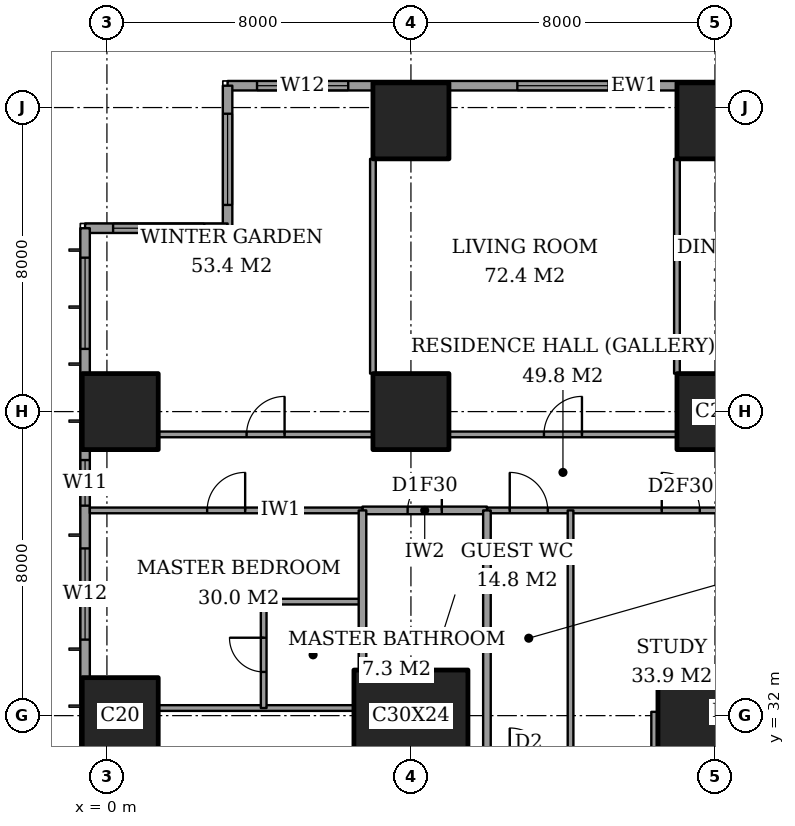
"""IFC4 building model, lengths in metres.
Left out: names, types, materials, properties, quantities, classifications, styles, units other than length and angle.
Written with IfcOpenShell. Run it as: python <this file> out.ifc"""

import sys

from ifc_helpers import new_model, si_unit, direction, frame, frame_2d, origin, origin_2d, place, context, subcontext, project, spatial, rectangle, extrude, element, fill, save


model = new_model("IFC4")
c1 = context("Model", 3, precision=1e-05, world=origin(), true_north=direction((0.0, 1.0)))
c2 = subcontext(c1, "Body", "Model", "MODEL_VIEW")
j1 = project(units=[si_unit("LENGTHUNIT", "METRE"), si_unit("PLANEANGLEUNIT", "RADIAN")], contexts=[c1])
p1 = place(None, origin())
s1 = spatial("IfcSite", under=j1, at=p1, CompositionType="ELEMENT")
p2 = place(p1, origin())
s2 = spatial("IfcBuilding", under=s1, at=p2, CompositionType="ELEMENT")
p3 = place(p2, frame((0.0, 0.0, 139.4)))
s3 = spatial("IfcBuildingStorey", under=s2, at=p3, CompositionType="ELEMENT", Elevation=139.4)
for number, where, z_axis, x_axis in (
    (1, (0.35, 32.0, 0.0), (0.0, 0.0, 1.0), (1.0, 0.0, 0.0)),
    (2, (0.35, 40.0, 0.0), (0.0, 0.0, 1.0), (1.0, 0.0, 0.0)),
):
    element("IfcColumn", number, at=place(p3, frame(where, z_axis=z_axis, x_axis=x_axis)), inside=s3, PredefinedType="COLUMN", context=c2, shape_type="SweptSolid", body=[
        extrude(rectangle(XDim=2.0, YDim=2.0, at=origin_2d()), origin(), (0.0, 0.0, 1.0), 3.6),
    ])
p4 = place(p3, frame((8.0, 32.0, 0.0), z_axis=(0.0, 0.0, 1.0), x_axis=(1.0, 0.0, 0.0)))
e3 = element("IfcColumn", 3, at=p4, inside=s3, PredefinedType="COLUMN", context=c2, shape_type="SweptSolid", body=[
    extrude(rectangle(XDim=3.0, YDim=2.4, at=origin_2d()), origin(), (0.0, 0.0, 1.0), 3.6),
])
for number, where, z_axis, x_axis in (
    (4, (8.0, 40.0, 0.0), (0.0, 0.0, 1.0), (1.0, 0.0, 0.0)),
    (5, (8.0, 47.65, 0.0), (0.0, 0.0, 1.0), (1.0, 0.0, 0.0)),
):
    element("IfcColumn", number, at=place(p3, frame(where, z_axis=z_axis, x_axis=x_axis)), inside=s3, PredefinedType="COLUMN", context=c2, shape_type="SweptSolid", body=[
        extrude(rectangle(XDim=2.0, YDim=2.0, at=origin_2d()), origin(), (0.0, 0.0, 1.0), 3.6),
    ])
p5 = place(p3, frame((16.0, 32.0, 0.0), z_axis=(0.0, 0.0, 1.0), x_axis=(1.0, 0.0, 0.0)))
e6 = element("IfcColumn", 6, at=p5, inside=s3, PredefinedType="COLUMN", context=c2, shape_type="SweptSolid", body=[
    extrude(rectangle(XDim=3.0, YDim=2.4, at=origin_2d()), origin(), (0.0, 0.0, 1.0), 3.6),
])
for number, where, z_axis, x_axis in (
    (7, (16.0, 40.0, 0.0), (0.0, 0.0, 1.0), (1.0, 0.0, 0.0)),
    (8, (16.0, 47.65, 0.0), (0.0, 0.0, 1.0), (1.0, 0.0, 0.0)),
):
    element("IfcColumn", number, at=place(p3, frame(where, z_axis=z_axis, x_axis=x_axis)), inside=s3, PredefinedType="COLUMN", context=c2, shape_type="SweptSolid", body=[
        extrude(rectangle(XDim=2.0, YDim=2.0, at=origin_2d()), origin(), (0.0, 0.0, 1.0), 3.6),
    ])
p6 = place(p3, frame((24.575, 48.575, 0.0), z_axis=(0.0, 0.0, 1.0), x_axis=(-1.0, 0.0, 0.0)))
e9 = element("IfcWall", 9, at=p6, inside=s3, PredefinedType="SOLIDWALL", context=c2, shape_type="SweptSolid", body=[
    extrude(rectangle(XDim=21.4, YDim=0.25, at=frame_2d((10.7, 0.0))), origin(), (0.0, 0.0, 1.0), 3.6),
])
p7 = place(p6, frame((2.35, 0.0, 0.4)))
e10 = element("IfcOpeningElement", 10, at=p7, cuts=e9, PredefinedType="OPENING", context=c2, shape_type="SweptSolid", body=[
    extrude(rectangle(XDim=1.2, YDim=2.2, at=frame_2d((0.6, 1.1))), frame((0.0, 0.135, 0.0), z_axis=(0.0, -1.0, 0.0), x_axis=(1.0, 0.0, 0.0)), (0.0, 0.0, 1.0), 0.27),
])
p8 = place(p6, frame((4.25, 0.0, 0.4)))
e11 = element("IfcOpeningElement", 11, at=p8, cuts=e9, PredefinedType="OPENING", context=c2, shape_type="SweptSolid", body=[
    extrude(rectangle(XDim=1.2, YDim=2.2, at=frame_2d((0.6, 1.1))), frame((0.0, 0.135, 0.0), z_axis=(0.0, -1.0, 0.0), x_axis=(1.0, 0.0, 0.0)), (0.0, 0.0, 1.0), 0.27),
])
p9 = place(p6, frame((5.975, 0.0, 0.4)))
e12 = element("IfcOpeningElement", 12, at=p9, cuts=e9, PredefinedType="OPENING", context=c2, shape_type="SweptSolid", body=[
    extrude(rectangle(XDim=1.2, YDim=2.2, at=frame_2d((0.6, 1.1))), frame((0.0, 0.135, 0.0), z_axis=(0.0, -1.0, 0.0), x_axis=(1.0, 0.0, 0.0)), (0.0, 0.0, 1.0), 0.27),
])
p10 = place(p6, frame((11.375, 0.0, 0.4)))
e13 = element("IfcOpeningElement", 13, at=p10, cuts=e9, PredefinedType="OPENING", context=c2, shape_type="SweptSolid", body=[
    extrude(rectangle(XDim=2.4, YDim=2.2, at=frame_2d((1.2, 1.1))), frame((0.0, 0.135, 0.0), z_axis=(0.0, -1.0, 0.0), x_axis=(1.0, 0.0, 0.0)), (0.0, 0.0, 1.0), 0.27),
])
p11 = place(p6, frame((18.225, 0.0, 0.4)))
e14 = element("IfcOpeningElement", 14, at=p11, cuts=e9, PredefinedType="OPENING", context=c2, shape_type="SweptSolid", body=[
    extrude(rectangle(XDim=2.4, YDim=2.2, at=frame_2d((1.2, 1.1))), frame((0.0, 0.135, 0.0), z_axis=(0.0, -1.0, 0.0), x_axis=(1.0, 0.0, 0.0)), (0.0, 0.0, 1.0), 0.27),
])
p12 = place(p3, frame((3.175, 48.575, 0.0), z_axis=(0.0, 0.0, 1.0), x_axis=(0.0, -1.0, 0.0)))
e15 = element("IfcWall", 15, at=p12, inside=s3, PredefinedType="SOLIDWALL", context=c2, shape_type="SweptSolid", body=[
    extrude(rectangle(XDim=3.75, YDim=0.25, at=frame_2d((1.875, 0.0))), origin(), (0.0, 0.0, 1.0), 3.6),
])
p13 = place(p12, frame((0.738, 0.0, 0.4)))
e16 = element("IfcOpeningElement", 16, at=p13, cuts=e15, PredefinedType="OPENING", context=c2, shape_type="SweptSolid", body=[
    extrude(rectangle(XDim=2.4, YDim=2.2, at=frame_2d((1.2, 1.1))), frame((0.0, 0.135, 0.0), z_axis=(0.0, -1.0, 0.0), x_axis=(1.0, 0.0, 0.0)), (0.0, 0.0, 1.0), 0.27),
])
p14 = place(p3, frame((3.175, 44.825, 0.0), z_axis=(0.0, 0.0, 1.0), x_axis=(-1.0, 0.0, 0.0)))
e17 = element("IfcWall", 17, at=p14, inside=s3, PredefinedType="SOLIDWALL", context=c2, shape_type="SweptSolid", body=[
    extrude(rectangle(XDim=3.75, YDim=0.25, at=frame_2d((1.875, 0.0))), origin(), (0.0, 0.0, 1.0), 3.6),
])
p15 = place(p14, frame((0.613, 0.0, 0.4)))
e18 = element("IfcOpeningElement", 18, at=p15, cuts=e17, PredefinedType="OPENING", context=c2, shape_type="SweptSolid", body=[
    extrude(rectangle(XDim=2.4, YDim=2.2, at=frame_2d((1.2, 1.1))), frame((0.0, 0.135, 0.0), z_axis=(0.0, -1.0, 0.0), x_axis=(1.0, 0.0, 0.0)), (0.0, 0.0, 1.0), 0.27),
])
p16 = place(p3, frame((-0.575, 44.825, 0.0), z_axis=(0.0, 0.0, 1.0), x_axis=(0.0, -1.0, 0.0)))
e19 = element("IfcWall", 19, at=p16, inside=s3, PredefinedType="SOLIDWALL", context=c2, shape_type="SweptSolid", body=[
    extrude(rectangle(XDim=41.65, YDim=0.25, at=frame_2d((20.825, 0.0))), origin(), (0.0, 0.0, 1.0), 3.6),
])
p17 = place(p16, frame((0.775, 0.0, 0.4)))
e20 = element("IfcOpeningElement", 20, at=p17, cuts=e19, PredefinedType="OPENING", context=c2, shape_type="SweptSolid", body=[
    extrude(rectangle(XDim=2.4, YDim=2.2, at=frame_2d((1.2, 1.1))), frame((0.0, 0.135, 0.0), z_axis=(0.0, -1.0, 0.0), x_axis=(1.0, 0.0, 0.0)), (0.0, 0.0, 1.0), 0.27),
])
p18 = place(p16, frame((6.1, 0.0, 0.4)))
e21 = element("IfcOpeningElement", 21, at=p18, cuts=e19, PredefinedType="OPENING", context=c2, shape_type="SweptSolid", body=[
    extrude(rectangle(XDim=1.2, YDim=2.2, at=frame_2d((0.6, 1.1))), frame((0.0, 0.135, 0.0), z_axis=(0.0, -1.0, 0.0), x_axis=(1.0, 0.0, 0.0)), (0.0, 0.0, 1.0), 0.27),
])
p19 = place(p16, frame((8.425, 0.0, 0.4)))
e22 = element("IfcOpeningElement", 22, at=p19, cuts=e19, PredefinedType="OPENING", context=c2, shape_type="SweptSolid", body=[
    extrude(rectangle(XDim=2.4, YDim=2.2, at=frame_2d((1.2, 1.1))), frame((0.0, 0.135, 0.0), z_axis=(0.0, -1.0, 0.0), x_axis=(1.0, 0.0, 0.0)), (0.0, 0.0, 1.0), 0.27),
])
p20 = place(p16, frame((15.625, 0.0, 0.4)))
e23 = element("IfcOpeningElement", 23, at=p20, cuts=e19, PredefinedType="OPENING", context=c2, shape_type="SweptSolid", body=[
    extrude(rectangle(XDim=2.4, YDim=2.2, at=frame_2d((1.2, 1.1))), frame((0.0, 0.135, 0.0), z_axis=(0.0, -1.0, 0.0), x_axis=(1.0, 0.0, 0.0)), (0.0, 0.0, 1.0), 0.27),
])
p21 = place(p16, frame((23.625, 0.0, 0.4)))
e24 = element("IfcOpeningElement", 24, at=p21, cuts=e19, PredefinedType="OPENING", context=c2, shape_type="SweptSolid", body=[
    extrude(rectangle(XDim=2.4, YDim=2.2, at=frame_2d((1.2, 1.1))), frame((0.0, 0.135, 0.0), z_axis=(0.0, -1.0, 0.0), x_axis=(1.0, 0.0, 0.0)), (0.0, 0.0, 1.0), 0.27),
])
p22 = place(p16, frame((30.825, 0.0, 0.4)))
e25 = element("IfcOpeningElement", 25, at=p22, cuts=e19, PredefinedType="OPENING", context=c2, shape_type="SweptSolid", body=[
    extrude(rectangle(XDim=2.4, YDim=2.2, at=frame_2d((1.2, 1.1))), frame((0.0, 0.135, 0.0), z_axis=(0.0, -1.0, 0.0), x_axis=(1.0, 0.0, 0.0)), (0.0, 0.0, 1.0), 0.27),
])
p23 = place(p16, frame((34.5, 0.0, 0.4)))
e26 = element("IfcOpeningElement", 26, at=p23, cuts=e19, PredefinedType="OPENING", context=c2, shape_type="SweptSolid", body=[
    extrude(rectangle(XDim=1.2, YDim=2.2, at=frame_2d((0.6, 1.1))), frame((0.0, 0.135, 0.0), z_axis=(0.0, -1.0, 0.0), x_axis=(1.0, 0.0, 0.0)), (0.0, 0.0, 1.0), 0.27),
])
p24 = place(p16, frame((38.475, 0.0, 0.4)))
e27 = element("IfcOpeningElement", 27, at=p24, cuts=e19, PredefinedType="OPENING", context=c2, shape_type="SweptSolid", body=[
    extrude(rectangle(XDim=2.4, YDim=2.2, at=frame_2d((1.2, 1.1))), frame((0.0, 0.135, 0.0), z_axis=(0.0, -1.0, 0.0), x_axis=(1.0, 0.0, 0.0)), (0.0, 0.0, 1.0), 0.27),
])
p25 = place(p3, frame((1.35, 32.2, 0.0), z_axis=(0.0, 0.0, 1.0), x_axis=(1.0, 0.0, 0.0)))
e28 = element("IfcWall", 28, at=p25, inside=s3, PredefinedType="PARTITIONING", context=c2, shape_type="SweptSolid", body=[
    extrude(rectangle(XDim=5.15, YDim=0.15, at=frame_2d((2.575, 0.0))), origin(), (0.0, 0.0, 1.0), 3.35),
])
p26 = place(p3, frame((4.125, 35.0, 0.0), z_axis=(0.0, 0.0, 1.0), x_axis=(1.0, 0.0, 0.0)))
e29 = element("IfcWall", 29, at=p26, inside=s3, PredefinedType="PARTITIONING", context=c2, shape_type="SweptSolid", body=[
    extrude(rectangle(XDim=2.6, YDim=0.15, at=frame_2d((1.3, 0.0))), origin(), (0.0, 0.0, 1.0), 3.35),
])
p27 = place(p3, frame((6.725, 37.4, 0.0), z_axis=(0.0, 0.0, 1.0), x_axis=(1.0, 0.0, 0.0)))
e30 = element("IfcWall", 30, at=p27, inside=s3, PredefinedType="PARTITIONING", context=c2, shape_type="SweptSolid", body=[
    extrude(rectangle(XDim=3.275, YDim=0.2, at=frame_2d((1.637, 0.0))), origin(), (0.0, 0.0, 1.0), 3.35),
])
p28 = place(p27, frame((1.188, 0.0, 0.0)))
e31 = element("IfcOpeningElement", 31, at=p28, cuts=e30, PredefinedType="OPENING", context=c2, shape_type="SweptSolid", body=[
    extrude(rectangle(XDim=0.9, YDim=2.1, at=frame_2d((0.45, 1.05))), frame((0.0, 0.11, 0.0), z_axis=(0.0, -1.0, 0.0), x_axis=(1.0, 0.0, 0.0)), (0.0, 0.0, 1.0), 0.22),
])
p29 = place(p3, frame((-0.45, 37.4, 0.0), z_axis=(0.0, 0.0, 1.0), x_axis=(1.0, 0.0, 0.0)))
e32 = element("IfcWall", 32, at=p29, inside=s3, PredefinedType="PARTITIONING", context=c2, shape_type="SweptSolid", body=[
    extrude(rectangle(XDim=7.175, YDim=0.15, at=frame_2d((3.587, 0.0))), origin(), (0.0, 0.0, 1.0), 3.35),
])
p30 = place(p29, frame((3.087, 0.0, 0.0)))
e33 = element("IfcOpeningElement", 33, at=p30, cuts=e32, PredefinedType="OPENING", context=c2, shape_type="SweptSolid", body=[
    extrude(rectangle(XDim=1.0, YDim=2.1, at=frame_2d((0.5, 1.05))), frame((0.0, 0.085, 0.0), z_axis=(0.0, -1.0, 0.0), x_axis=(1.0, 0.0, 0.0)), (0.0, 0.0, 1.0), 0.17),
])
p31 = place(p3, frame((10.0, 37.4, 0.0), z_axis=(0.0, 0.0, 1.0), x_axis=(1.0, 0.0, 0.0)))
e34 = element("IfcWall", 34, at=p31, inside=s3, PredefinedType="PARTITIONING", context=c2, shape_type="SweptSolid", body=[
    extrude(rectangle(XDim=14.561, YDim=0.15, at=frame_2d((7.281, 0.0))), origin(), (0.0, 0.0, 1.0), 3.35),
])
p32 = place(p31, frame((0.6, 0.0, 0.0)))
e35 = element("IfcOpeningElement", 35, at=p32, cuts=e34, PredefinedType="OPENING", context=c2, shape_type="SweptSolid", body=[
    extrude(rectangle(XDim=1.0, YDim=2.1, at=frame_2d((0.5, 1.05))), frame((0.0, 0.085, 0.0), z_axis=(0.0, -1.0, 0.0), x_axis=(1.0, 0.0, 0.0)), (0.0, 0.0, 1.0), 0.17),
])
p33 = place(p31, frame((4.6, 0.0, 0.0)))
e36 = element("IfcOpeningElement", 36, at=p33, cuts=e34, PredefinedType="OPENING", context=c2, shape_type="SweptSolid", body=[
    extrude(rectangle(XDim=1.0, YDim=2.1, at=frame_2d((0.5, 1.05))), frame((0.0, 0.085, 0.0), z_axis=(0.0, -1.0, 0.0), x_axis=(1.0, 0.0, 0.0)), (0.0, 0.0, 1.0), 0.17),
])
p34 = place(p31, frame((10.725, 0.0, 0.0)))
e37 = element("IfcOpeningElement", 37, at=p34, cuts=e34, PredefinedType="OPENING", context=c2, shape_type="SweptSolid", body=[
    extrude(rectangle(XDim=1.0, YDim=2.1, at=frame_2d((0.5, 1.05))), frame((0.0, 0.085, 0.0), z_axis=(0.0, -1.0, 0.0), x_axis=(1.0, 0.0, 0.0)), (0.0, 0.0, 1.0), 0.17),
])
p35 = place(p3, frame((1.35, 39.4, 0.0), z_axis=(0.0, 0.0, 1.0), x_axis=(1.0, 0.0, 0.0)))
e38 = element("IfcWall", 38, at=p35, inside=s3, PredefinedType="PARTITIONING", context=c2, shape_type="SweptSolid", body=[
    extrude(rectangle(XDim=5.65, YDim=0.15, at=frame_2d((2.825, 0.0))), origin(), (0.0, 0.0, 1.0), 3.35),
])
p36 = place(p35, frame((2.325, 0.0, 0.0)))
e39 = element("IfcOpeningElement", 39, at=p36, cuts=e38, PredefinedType="OPENING", context=c2, shape_type="SweptSolid", body=[
    extrude(rectangle(XDim=1.0, YDim=2.1, at=frame_2d((0.5, 1.05))), frame((0.0, 0.085, 0.0), z_axis=(0.0, -1.0, 0.0), x_axis=(1.0, 0.0, 0.0)), (0.0, 0.0, 1.0), 0.17),
])
p37 = place(p3, frame((9.0, 39.4, 0.0), z_axis=(0.0, 0.0, 1.0), x_axis=(1.0, 0.0, 0.0)))
e40 = element("IfcWall", 40, at=p37, inside=s3, PredefinedType="PARTITIONING", context=c2, shape_type="SweptSolid", body=[
    extrude(rectangle(XDim=6.0, YDim=0.15, at=frame_2d((3.0, 0.0))), origin(), (0.0, 0.0, 1.0), 3.35),
])
p38 = place(p37, frame((2.5, 0.0, 0.0)))
e41 = element("IfcOpeningElement", 41, at=p38, cuts=e40, PredefinedType="OPENING", context=c2, shape_type="SweptSolid", body=[
    extrude(rectangle(XDim=1.0, YDim=2.1, at=frame_2d((0.5, 1.05))), frame((0.0, 0.085, 0.0), z_axis=(0.0, -1.0, 0.0), x_axis=(1.0, 0.0, 0.0)), (0.0, 0.0, 1.0), 0.17),
])
p39 = place(p3, frame((4.125, 32.2, 0.0), z_axis=(0.0, 0.0, 1.0), x_axis=(0.0, 1.0, 0.0)))
e42 = element("IfcWall", 42, at=p39, inside=s3, PredefinedType="PARTITIONING", context=c2, shape_type="SweptSolid", body=[
    extrude(rectangle(XDim=2.8, YDim=0.15, at=frame_2d((1.4, 0.0))), origin(), (0.0, 0.0, 1.0), 3.35),
])
p40 = place(p39, frame((0.95, 0.0, 0.0)))
e43 = element("IfcOpeningElement", 43, at=p40, cuts=e42, PredefinedType="OPENING", context=c2, shape_type="SweptSolid", body=[
    extrude(rectangle(XDim=0.9, YDim=2.1, at=frame_2d((0.45, 1.05))), frame((0.0, 0.085, 0.0), z_axis=(0.0, -1.0, 0.0), x_axis=(1.0, 0.0, 0.0)), (0.0, 0.0, 1.0), 0.17),
])
p41 = place(p3, frame((6.725, 33.2, 0.0), z_axis=(0.0, 0.0, 1.0), x_axis=(0.0, 1.0, 0.0)))
e44 = element("IfcWall", 44, at=p41, inside=s3, PredefinedType="PARTITIONING", context=c2, shape_type="SweptSolid", body=[
    extrude(rectangle(XDim=4.2, YDim=0.2, at=frame_2d((2.1, 0.0))), origin(), (0.0, 0.0, 1.0), 3.35),
])
p42 = place(p3, frame((7.0, 41.0, 0.0), z_axis=(0.0, 0.0, 1.0), x_axis=(0.0, 1.0, 0.0)))
e45 = element("IfcWall", 45, at=p42, inside=s3, PredefinedType="PARTITIONING", context=c2, shape_type="SweptSolid", body=[
    extrude(rectangle(XDim=5.65, YDim=0.15, at=frame_2d((2.825, 0.0))), origin(), (0.0, 0.0, 1.0), 3.35),
])
p43 = place(p3, frame((10.0, 31.0, 0.0), z_axis=(0.0, 0.0, 1.0), x_axis=(0.0, 1.0, 0.0)))
e46 = element("IfcWall", 46, at=p43, inside=s3, PredefinedType="PARTITIONING", context=c2, shape_type="SweptSolid", body=[
    extrude(rectangle(XDim=6.4, YDim=0.2, at=frame_2d((3.2, 0.0))), origin(), (0.0, 0.0, 1.0), 3.35),
])
p44 = place(p3, frame((12.2, 30.675, 0.0), z_axis=(0.0, 0.0, 1.0), x_axis=(0.0, 1.0, 0.0)))
e47 = element("IfcWall", 47, at=p44, inside=s3, PredefinedType="PARTITIONING", context=c2, shape_type="SweptSolid", body=[
    extrude(rectangle(XDim=6.725, YDim=0.15, at=frame_2d((3.362, 0.0))), origin(), (0.0, 0.0, 1.0), 3.35),
])
p45 = place(p3, frame((14.4, 30.675, 0.0), z_axis=(0.0, 0.0, 1.0), x_axis=(0.0, 1.0, 0.0)))
e48 = element("IfcWall", 48, at=p45, inside=s3, PredefinedType="PARTITIONING", context=c2, shape_type="SweptSolid", body=[
    extrude(rectangle(XDim=1.425, YDim=0.15, at=frame_2d((0.712, 0.0))), origin(), (0.0, 0.0, 1.0), 3.35),
])
p46 = place(p3, frame((15.0, 41.0, 0.0), z_axis=(0.0, 0.0, 1.0), x_axis=(0.0, 1.0, 0.0)))
e49 = element("IfcWall", 49, at=p46, inside=s3, PredefinedType="PARTITIONING", context=c2, shape_type="SweptSolid", body=[
    extrude(rectangle(XDim=5.65, YDim=0.15, at=frame_2d((2.825, 0.0))), origin(), (0.0, 0.0, 1.0), 3.35),
])
p47 = place(p10, origin())
e50 = element("IfcWindow", 50, at=p47, inside=s3, PartitioningType="SINGLE_PANEL", PredefinedType="WINDOW", context=c2, shape_type="SweptSolid", body=[
    extrude(rectangle(XDim=2.4, YDim=2.2, at=frame_2d((1.2, 1.1))), frame((0.0, 0.03, 0.0), z_axis=(0.0, -1.0, 0.0), x_axis=(1.0, 0.0, 0.0)), (0.0, 0.0, 1.0), 0.06),
])
fill(e13, e50)
p48 = place(p11, origin())
e51 = element("IfcWindow", 51, at=p48, inside=s3, PartitioningType="SINGLE_PANEL", PredefinedType="WINDOW", context=c2, shape_type="SweptSolid", body=[
    extrude(rectangle(XDim=2.4, YDim=2.2, at=frame_2d((1.2, 1.1))), frame((0.0, 0.03, 0.0), z_axis=(0.0, -1.0, 0.0), x_axis=(1.0, 0.0, 0.0)), (0.0, 0.0, 1.0), 0.06),
])
fill(e14, e51)
p49 = place(p13, origin())
e52 = element("IfcWindow", 52, at=p49, inside=s3, PartitioningType="SINGLE_PANEL", PredefinedType="WINDOW", context=c2, shape_type="SweptSolid", body=[
    extrude(rectangle(XDim=2.4, YDim=2.2, at=frame_2d((1.2, 1.1))), frame((0.0, 0.03, 0.0), z_axis=(0.0, -1.0, 0.0), x_axis=(1.0, 0.0, 0.0)), (0.0, 0.0, 1.0), 0.06),
])
fill(e16, e52)
p50 = place(p15, origin())
e53 = element("IfcWindow", 53, at=p50, inside=s3, PartitioningType="SINGLE_PANEL", PredefinedType="WINDOW", context=c2, shape_type="SweptSolid", body=[
    extrude(rectangle(XDim=2.4, YDim=2.2, at=frame_2d((1.2, 1.1))), frame((0.0, 0.03, 0.0), z_axis=(0.0, -1.0, 0.0), x_axis=(1.0, 0.0, 0.0)), (0.0, 0.0, 1.0), 0.06),
])
fill(e18, e53)
p51 = place(p17, origin())
e54 = element("IfcWindow", 54, at=p51, inside=s3, PartitioningType="SINGLE_PANEL", PredefinedType="WINDOW", context=c2, shape_type="SweptSolid", body=[
    extrude(rectangle(XDim=2.4, YDim=2.2, at=frame_2d((1.2, 1.1))), frame((0.0, 0.03, 0.0), z_axis=(0.0, -1.0, 0.0), x_axis=(1.0, 0.0, 0.0)), (0.0, 0.0, 1.0), 0.06),
])
fill(e20, e54)
p52 = place(p18, origin())
e55 = element("IfcWindow", 55, at=p52, inside=s3, PartitioningType="SINGLE_PANEL", PredefinedType="WINDOW", context=c2, shape_type="SweptSolid", body=[
    extrude(rectangle(XDim=1.2, YDim=2.2, at=frame_2d((0.6, 1.1))), frame((0.0, 0.03, 0.0), z_axis=(0.0, -1.0, 0.0), x_axis=(1.0, 0.0, 0.0)), (0.0, 0.0, 1.0), 0.06),
])
fill(e21, e55)
p53 = place(p19, origin())
e56 = element("IfcWindow", 56, at=p53, inside=s3, PartitioningType="SINGLE_PANEL", PredefinedType="WINDOW", context=c2, shape_type="SweptSolid", body=[
    extrude(rectangle(XDim=2.4, YDim=2.2, at=frame_2d((1.2, 1.1))), frame((0.0, 0.03, 0.0), z_axis=(0.0, -1.0, 0.0), x_axis=(1.0, 0.0, 0.0)), (0.0, 0.0, 1.0), 0.06),
])
fill(e22, e56)
p54 = place(p36, origin())
e57 = element("IfcDoor", 57, at=p54, inside=s3, OperationType="SINGLE_SWING_LEFT", PredefinedType="DOOR", context=c2, shape_type="SweptSolid", body=[
    extrude(rectangle(XDim=1.0, YDim=2.1, at=frame_2d((0.5, 1.05))), frame((0.0, 0.025, 0.0), z_axis=(0.0, -1.0, 0.0), x_axis=(1.0, 0.0, 0.0)), (0.0, 0.0, 1.0), 0.05),
])
fill(e39, e57)
p55 = place(p38, origin())
e58 = element("IfcDoor", 58, at=p55, inside=s3, OperationType="SINGLE_SWING_LEFT", PredefinedType="DOOR", context=c2, shape_type="SweptSolid", body=[
    extrude(rectangle(XDim=1.0, YDim=2.1, at=frame_2d((0.5, 1.05))), frame((0.0, 0.025, 0.0), z_axis=(0.0, -1.0, 0.0), x_axis=(1.0, 0.0, 0.0)), (0.0, 0.0, 1.0), 0.05),
])
fill(e41, e58)
p56 = place(p32, origin())
e59 = element("IfcDoor", 59, at=p56, inside=s3, OperationType="SINGLE_SWING_RIGHT", PredefinedType="DOOR", context=c2, shape_type="SweptSolid", body=[
    extrude(rectangle(XDim=1.0, YDim=2.1, at=frame_2d((0.5, 1.05))), frame((0.0, 0.025, 0.0), z_axis=(0.0, -1.0, 0.0), x_axis=(1.0, 0.0, 0.0)), (0.0, 0.0, 1.0), 0.05),
])
fill(e35, e59)
p57 = place(p40, origin())
e60 = element("IfcDoor", 60, at=p57, inside=s3, OperationType="SINGLE_SWING_LEFT", PredefinedType="DOOR", context=c2, shape_type="SweptSolid", body=[
    extrude(rectangle(XDim=0.9, YDim=2.1, at=frame_2d((0.45, 1.05))), frame((0.0, 0.025, 0.0), z_axis=(0.0, -1.0, 0.0), x_axis=(1.0, 0.0, 0.0)), (0.0, 0.0, 1.0), 0.05),
])
fill(e43, e60)
p58 = place(p30, origin())
e61 = element("IfcDoor", 61, at=p58, inside=s3, OperationType="SINGLE_SWING_LEFT", PredefinedType="DOOR", context=c2, shape_type="SweptSolid", body=[
    extrude(rectangle(XDim=1.0, YDim=2.1, at=frame_2d((0.5, 1.05))), frame((0.0, 0.025, 0.0), z_axis=(0.0, -1.0, 0.0), x_axis=(1.0, 0.0, 0.0)), (0.0, 0.0, 1.0), 0.05),
])
fill(e33, e61)
p59 = place(p28, origin())
e62 = element("IfcDoor", 62, at=p59, inside=s3, OperationType="SINGLE_SWING_LEFT", PredefinedType="DOOR", context=c2, shape_type="SweptSolid", body=[
    extrude(rectangle(XDim=0.9, YDim=2.1, at=frame_2d((0.45, 1.05))), frame((0.0, 0.025, 0.0), z_axis=(0.0, -1.0, 0.0), x_axis=(1.0, 0.0, 0.0)), (0.0, 0.0, 1.0), 0.05),
])
fill(e31, e62)
p60 = place(p33, origin())
e63 = element("IfcDoor", 63, at=p60, inside=s3, OperationType="SINGLE_SWING_RIGHT", PredefinedType="DOOR", context=c2, shape_type="SweptSolid", body=[
    extrude(rectangle(XDim=1.0, YDim=2.1, at=frame_2d((0.5, 1.05))), frame((0.0, 0.025, 0.0), z_axis=(0.0, -1.0, 0.0), x_axis=(1.0, 0.0, 0.0)), (0.0, 0.0, 1.0), 0.05),
])
fill(e36, e63)
save(model, sys.argv[1])
